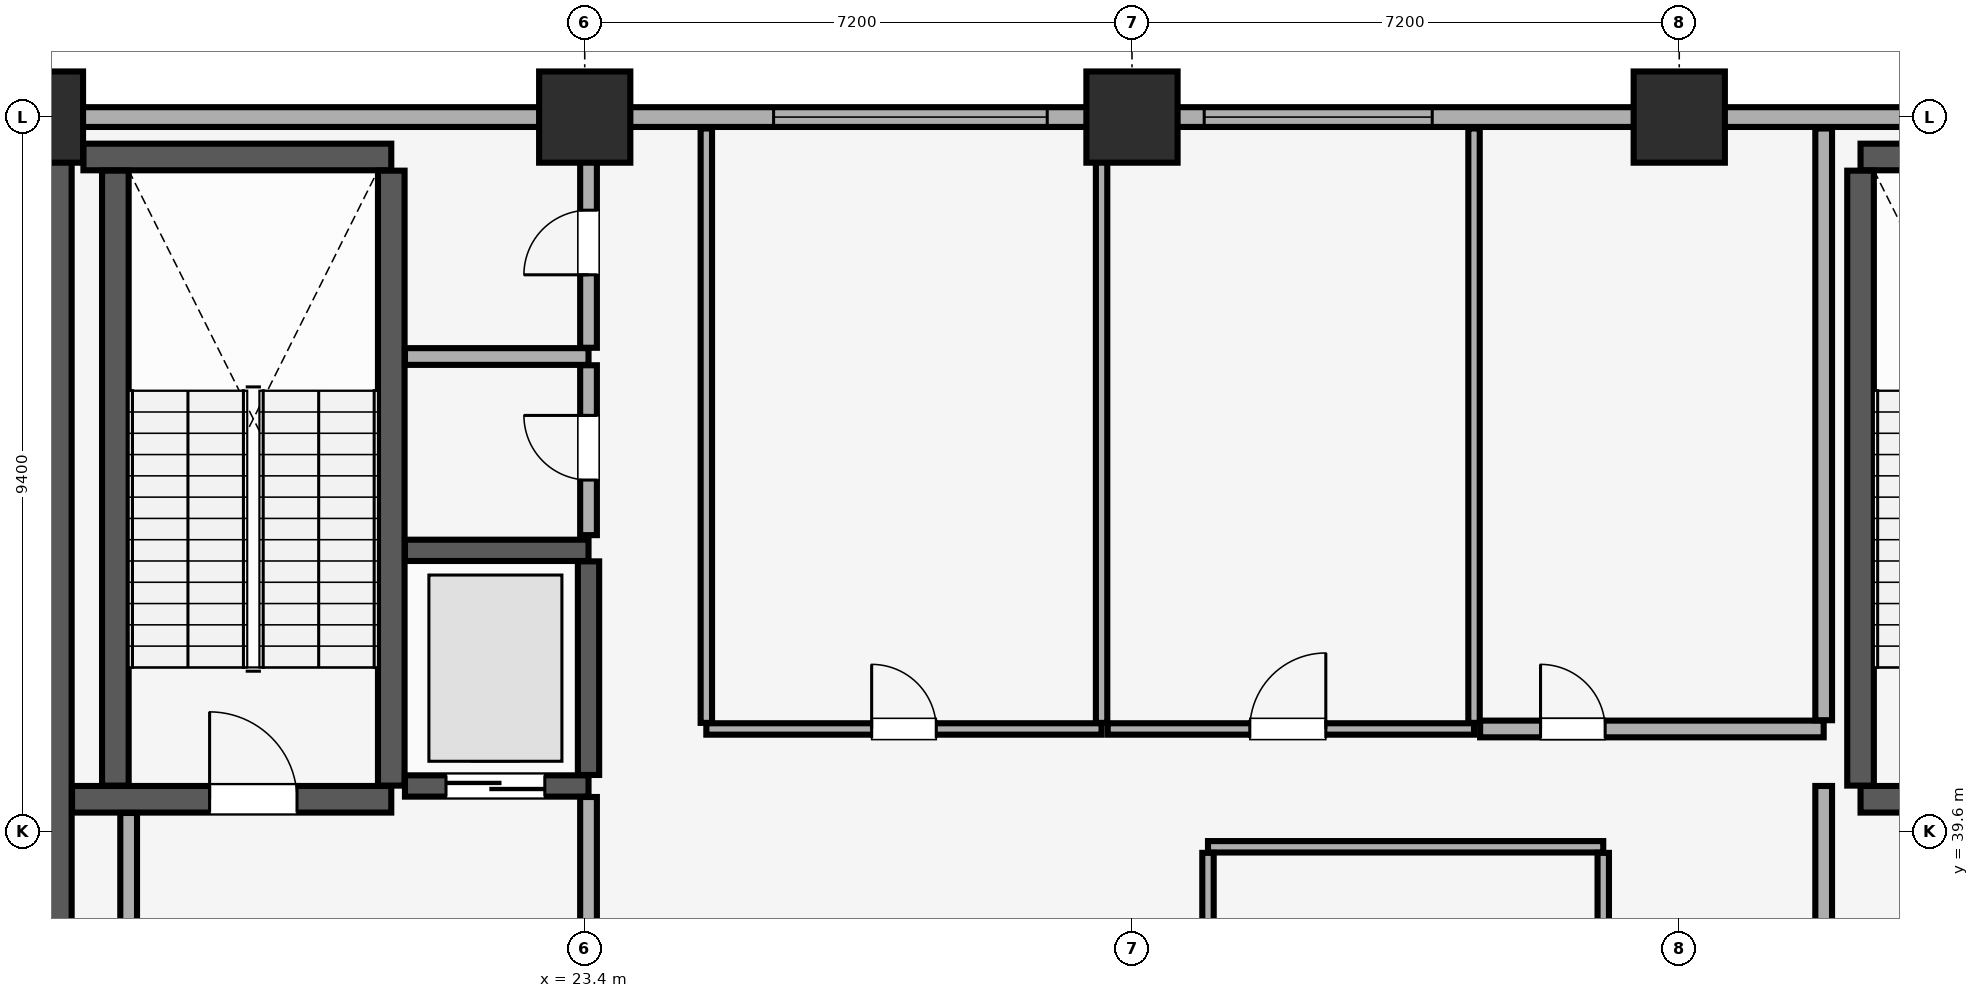
"""IFC4 building model, lengths in metres.
Left out: names, types, materials, properties, quantities, classifications, styles, units other than length and angle.
Written with IfcOpenShell. Run it as: python <this file> out.ifc"""

import sys

from ifc_helpers import new_model, si_unit, direction, frame, frame_2d, origin, origin_2d, place, context, subcontext, project, spatial, rectangle, extrude, element, fill, save


model = new_model("IFC4")
c1 = context("Model", 3, precision=1e-05, world=origin(), true_north=direction((0.0, 1.0)))
c2 = subcontext(c1, "Body", "Model", "MODEL_VIEW")
j1 = project(units=[si_unit("LENGTHUNIT", "METRE"), si_unit("PLANEANGLEUNIT", "RADIAN")], contexts=[c1])
p1 = place(None, origin())
s1 = spatial("IfcSite", under=j1, at=p1, CompositionType="ELEMENT")
p2 = place(p1, origin())
s2 = spatial("IfcBuilding", under=s1, at=p2, CompositionType="ELEMENT")
p3 = place(p2, frame((0.0, 0.0, 130.55)))
s3 = spatial("IfcBuildingStorey", under=s2, at=p3, CompositionType="ELEMENT", Elevation=130.55)
for number, where, z_axis, x_axis in (
    (1, (16.2, 49.0, 0.0), (0.0, 0.0, 1.0), (1.0, 0.0, 0.0)),
    (2, (23.4, 49.0, 0.0), (0.0, 0.0, 1.0), (1.0, 0.0, 0.0)),
    (3, (30.6, 49.0, 0.0), (0.0, 0.0, 1.0), (1.0, 0.0, 0.0)),
    (4, (37.8, 49.0, 0.0), (0.0, 0.0, 1.0), (1.0, 0.0, 0.0)),
):
    element("IfcColumn", number, at=place(p3, frame(where, z_axis=z_axis, x_axis=x_axis)), inside=s3, PredefinedType="COLUMN", context=c2, shape_type="SweptSolid", body=[
        extrude(rectangle(XDim=1.2, YDim=1.2, at=origin_2d()), origin(), (0.0, 0.0, 1.0), 4.56),
    ])
p4 = place(p3, frame((79.8, 49.0, 0.0), z_axis=(0.0, 0.0, 1.0), x_axis=(-1.0, 0.0, 0.0)))
e5 = element("IfcWall", 5, at=p4, inside=s3, PredefinedType="SOLIDWALL", context=c2, shape_type="SweptSolid", body=[
    extrude(rectangle(XDim=75.6, YDim=0.26, at=frame_2d((37.8, 0.0))), origin(), (0.0, 0.0, 1.0), 3.4),
])
p5 = place(p4, frame((71.815, 0.0, 0.85)))
e6 = element("IfcOpeningElement", 6, at=p5, cuts=e5, PredefinedType="OPENING", context=c2, shape_type="SweptSolid", body=[
    extrude(rectangle(XDim=3.0, YDim=1.5, at=frame_2d((1.5, 0.75))), frame((0.0, 0.14, 0.0), z_axis=(0.0, -1.0, 0.0), x_axis=(1.0, 0.0, 0.0)), (0.0, 0.0, 1.0), 0.28),
])
p6 = place(p4, frame((65.775, 0.0, 0.85)))
e7 = element("IfcOpeningElement", 7, at=p6, cuts=e5, PredefinedType="OPENING", context=c2, shape_type="SweptSolid", body=[
    extrude(rectangle(XDim=3.0, YDim=1.5, at=frame_2d((1.5, 0.75))), frame((0.0, 0.14, 0.0), z_axis=(0.0, -1.0, 0.0), x_axis=(1.0, 0.0, 0.0)), (0.0, 0.0, 1.0), 0.28),
])
p7 = place(p4, frame((6.825, 0.0, 0.85)))
e8 = element("IfcOpeningElement", 8, at=p7, cuts=e5, PredefinedType="OPENING", context=c2, shape_type="SweptSolid", body=[
    extrude(rectangle(XDim=3.0, YDim=1.5, at=frame_2d((1.5, 0.75))), frame((0.0, 0.14, 0.0), z_axis=(0.0, -1.0, 0.0), x_axis=(1.0, 0.0, 0.0)), (0.0, 0.0, 1.0), 0.28),
])
p8 = place(p4, frame((0.785, 0.0, 0.85)))
e9 = element("IfcOpeningElement", 9, at=p8, cuts=e5, PredefinedType="OPENING", context=c2, shape_type="SweptSolid", body=[
    extrude(rectangle(XDim=3.0, YDim=1.5, at=frame_2d((1.5, 0.75))), frame((0.0, 0.14, 0.0), z_axis=(0.0, -1.0, 0.0), x_axis=(1.0, 0.0, 0.0)), (0.0, 0.0, 1.0), 0.28),
])
p9 = place(p4, frame((50.315, 0.0, 0.9)))
e10 = element("IfcOpeningElement", 10, at=p9, cuts=e5, PredefinedType="OPENING", context=c2, shape_type="SweptSolid", body=[
    extrude(rectangle(XDim=3.6, YDim=1.5, at=frame_2d((1.8, 0.75))), frame((0.0, 0.14, 0.0), z_axis=(0.0, -1.0, 0.0), x_axis=(1.0, 0.0, 0.0)), (0.0, 0.0, 1.0), 0.28),
])
p10 = place(p4, frame((45.25, 0.0, 0.9)))
e11 = element("IfcOpeningElement", 11, at=p10, cuts=e5, PredefinedType="OPENING", context=c2, shape_type="SweptSolid", body=[
    extrude(rectangle(XDim=3.0, YDim=1.5, at=frame_2d((1.5, 0.75))), frame((0.0, 0.14, 0.0), z_axis=(0.0, -1.0, 0.0), x_axis=(1.0, 0.0, 0.0)), (0.0, 0.0, 1.0), 0.28),
])
p11 = place(p4, frame((28.1, 0.0, 0.9)))
e12 = element("IfcOpeningElement", 12, at=p11, cuts=e5, PredefinedType="OPENING", context=c2, shape_type="SweptSolid", body=[
    extrude(rectangle(XDim=3.6, YDim=1.5, at=frame_2d((1.8, 0.75))), frame((0.0, 0.14, 0.0), z_axis=(0.0, -1.0, 0.0), x_axis=(1.0, 0.0, 0.0)), (0.0, 0.0, 1.0), 0.28),
])
p12 = place(p4, frame((23.035, 0.0, 0.9)))
e13 = element("IfcOpeningElement", 13, at=p12, cuts=e5, PredefinedType="OPENING", context=c2, shape_type="SweptSolid", body=[
    extrude(rectangle(XDim=2.4, YDim=1.5, at=frame_2d((1.2, 0.75))), frame((0.0, 0.14, 0.0), z_axis=(0.0, -1.0, 0.0), x_axis=(1.0, 0.0, 0.0)), (0.0, 0.0, 1.0), 0.28),
])
p13 = place(p3, frame((16.2, 29.4, 0.0), z_axis=(0.0, 0.0, 1.0), x_axis=(0.0, 1.0, 0.0)))
e14 = element("IfcWall", 14, at=p13, inside=s3, PredefinedType="SHEAR", context=c2, shape_type="SweptSolid", body=[
    extrude(rectangle(XDim=19.2, YDim=0.9, at=frame_2d((9.6, 0.0))), origin(), (0.0, 0.0, 1.0), 4.52),
])
p14 = place(p3, frame((16.655, 40.025, 0.0), z_axis=(0.0, 0.0, 1.0), x_axis=(1.0, 0.0, 0.0)))
e15 = element("IfcWall", 15, at=p14, inside=s3, PredefinedType="SHEAR", context=c2, shape_type="SweptSolid", body=[
    extrude(rectangle(XDim=4.2, YDim=0.35, at=frame_2d((2.1, 0.0))), origin(), (0.0, 0.0, 1.0), 4.52),
])
p15 = place(p14, frame((1.81, 0.0, 0.0)))
e16 = element("IfcOpeningElement", 16, at=p15, cuts=e15, PredefinedType="OPENING", context=c2, shape_type="SweptSolid", body=[
    extrude(rectangle(XDim=1.15, YDim=2.15, at=frame_2d((0.575, 1.075))), frame((0.0, 0.185, 0.0), z_axis=(0.0, -1.0, 0.0), x_axis=(1.0, 0.0, 0.0)), (0.0, 0.0, 1.0), 0.37),
])
p16 = place(p3, frame((16.805, 48.475, 0.0), z_axis=(0.0, 0.0, 1.0), x_axis=(1.0, 0.0, 0.0)))
e17 = element("IfcWall", 17, at=p16, inside=s3, PredefinedType="SHEAR", context=c2, shape_type="SweptSolid", body=[
    extrude(rectangle(XDim=4.05, YDim=0.35, at=frame_2d((2.025, 0.0))), origin(), (0.0, 0.0, 1.0), 4.52),
])
for number, where, z_axis, x_axis in (
    (18, (17.225, 40.205, 0.0), (0.0, 0.0, 1.0), (0.0, 1.0, 0.0)),
    (19, (20.855, 40.205, 0.0), (0.0, 0.0, 1.0), (0.0, 1.0, 0.0)),
):
    element("IfcWall", number, at=place(p3, frame(where, z_axis=z_axis, x_axis=x_axis)), inside=s3, PredefinedType="SHEAR", context=c2, shape_type="SweptSolid", body=[
        extrude(rectangle(XDim=8.09, YDim=0.35, at=frame_2d((4.045, 0.0))), origin(), (0.0, 0.0, 1.0), 4.52),
    ])
p17 = place(p3, frame((40.185, 40.025, 0.0), z_axis=(0.0, 0.0, 1.0), x_axis=(1.0, 0.0, 0.0)))
e20 = element("IfcWall", 20, at=p17, inside=s3, PredefinedType="SHEAR", context=c2, shape_type="SweptSolid", body=[
    extrude(rectangle(XDim=3.63, YDim=0.35, at=frame_2d((1.815, 0.0))), origin(), (0.0, 0.0, 1.0), 4.52),
])
p18 = place(p17, frame((1.24, 0.0, 0.0)))
e21 = element("IfcOpeningElement", 21, at=p18, cuts=e20, PredefinedType="OPENING", context=c2, shape_type="SweptSolid", body=[
    extrude(rectangle(XDim=1.15, YDim=2.15, at=frame_2d((0.575, 1.075))), frame((0.0, 0.185, 0.0), z_axis=(0.0, -1.0, 0.0), x_axis=(1.0, 0.0, 0.0)), (0.0, 0.0, 1.0), 0.37),
])
p19 = place(p3, frame((40.185, 48.475, 0.0), z_axis=(0.0, 0.0, 1.0), x_axis=(1.0, 0.0, 0.0)))
e22 = element("IfcWall", 22, at=p19, inside=s3, PredefinedType="SHEAR", context=c2, shape_type="SweptSolid", body=[
    extrude(rectangle(XDim=3.63, YDim=0.35, at=frame_2d((1.815, 0.0))), origin(), (0.0, 0.0, 1.0), 4.52),
])
p20 = place(p3, frame((40.185, 40.205, 0.0), z_axis=(0.0, 0.0, 1.0), x_axis=(0.0, 1.0, 0.0)))
e23 = element("IfcWall", 23, at=p20, inside=s3, PredefinedType="SHEAR", context=c2, shape_type="SweptSolid", body=[
    extrude(rectangle(XDim=8.09, YDim=0.35, at=frame_2d((4.045, 0.0))), origin(), (0.0, 0.0, 1.0), 4.52),
])
p21 = place(p3, frame((21.035, 40.2, 0.0), z_axis=(0.0, 0.0, 1.0), x_axis=(1.0, 0.0, 0.0)))
e24 = element("IfcWall", 24, at=p21, inside=s3, PredefinedType="SHEAR", context=c2, shape_type="SweptSolid", body=[
    extrude(rectangle(XDim=2.415, YDim=0.28, at=frame_2d((1.208, 0.0))), origin(), (0.0, 0.0, 1.0), 4.52),
])
p22 = place(p21, frame((0.54, 0.0, 0.0)))
e25 = element("IfcOpeningElement", 25, at=p22, cuts=e24, PredefinedType="OPENING", context=c2, shape_type="SweptSolid", body=[
    extrude(rectangle(XDim=1.3, YDim=2.3, at=frame_2d((0.65, 1.15))), frame((0.0, 0.15, 0.0), z_axis=(0.0, -1.0, 0.0), x_axis=(1.0, 0.0, 0.0)), (0.0, 0.0, 1.0), 0.3),
])
p23 = place(p3, frame((21.035, 43.3, 0.0), z_axis=(0.0, 0.0, 1.0), x_axis=(1.0, 0.0, 0.0)))
e26 = element("IfcWall", 26, at=p23, inside=s3, PredefinedType="SHEAR", context=c2, shape_type="SweptSolid", body=[
    extrude(rectangle(XDim=2.415, YDim=0.28, at=frame_2d((1.208, 0.0))), origin(), (0.0, 0.0, 1.0), 4.52),
])
p24 = place(p3, frame((23.45, 40.345, 0.0), z_axis=(0.0, 0.0, 1.0), x_axis=(0.0, 1.0, 0.0)))
e27 = element("IfcWall", 27, at=p24, inside=s3, PredefinedType="SHEAR", context=c2, shape_type="SweptSolid", body=[
    extrude(rectangle(XDim=2.81, YDim=0.28, at=frame_2d((1.405, 0.0))), origin(), (0.0, 0.0, 1.0), 4.52),
])
p25 = place(p3, frame((17.4, 34.415, 0.0), z_axis=(0.0, 0.0, 1.0), x_axis=(0.0, 1.0, 0.0)))
e28 = element("IfcWall", 28, at=p25, inside=s3, PredefinedType="PARTITIONING", context=c2, shape_type="SweptSolid", body=[
    extrude(rectangle(XDim=5.43, YDim=0.22, at=frame_2d((2.715, 0.0))), origin(), (0.0, 0.0, 1.0), 4.52),
])
p26 = place(p3, frame((23.45, 34.415, 0.0), z_axis=(0.0, 0.0, 1.0), x_axis=(0.0, 1.0, 0.0)))
e29 = element("IfcWall", 29, at=p26, inside=s3, PredefinedType="PARTITIONING", context=c2, shape_type="SweptSolid", body=[
    extrude(rectangle(XDim=5.64, YDim=0.22, at=frame_2d((2.82, 0.0))), origin(), (0.0, 0.0, 1.0), 4.52),
])
p27 = place(p3, frame((39.7, 34.415, 0.0), z_axis=(0.0, 0.0, 1.0), x_axis=(0.0, 1.0, 0.0)))
e30 = element("IfcWall", 30, at=p27, inside=s3, PredefinedType="PARTITIONING", context=c2, shape_type="SweptSolid", body=[
    extrude(rectangle(XDim=5.785, YDim=0.22, at=frame_2d((2.893, 0.0))), origin(), (0.0, 0.0, 1.0), 4.52),
])
p28 = place(p3, frame((21.035, 45.85, 0.0), z_axis=(0.0, 0.0, 1.0), x_axis=(1.0, 0.0, 0.0)))
e31 = element("IfcWall", 31, at=p28, inside=s3, PredefinedType="PARTITIONING", context=c2, shape_type="SweptSolid", body=[
    extrude(rectangle(XDim=2.415, YDim=0.22, at=frame_2d((1.208, 0.0))), origin(), (0.0, 0.0, 1.0), 4.52),
])
p29 = place(p3, frame((23.45, 43.5, 0.0), z_axis=(0.0, 0.0, 1.0), x_axis=(0.0, 1.0, 0.0)))
e32 = element("IfcWall", 32, at=p29, inside=s3, PredefinedType="PARTITIONING", context=c2, shape_type="SweptSolid", body=[
    extrude(rectangle(XDim=2.235, YDim=0.22, at=frame_2d((1.118, 0.0))), origin(), (0.0, 0.0, 1.0), 4.52),
])
p30 = place(p29, frame((0.725, 0.0, 0.0)))
e33 = element("IfcOpeningElement", 33, at=p30, cuts=e32, PredefinedType="OPENING", context=c2, shape_type="SweptSolid", body=[
    extrude(rectangle(XDim=0.85, YDim=2.1, at=frame_2d((0.425, 1.05))), frame((0.0, 0.12, 0.0), z_axis=(0.0, -1.0, 0.0), x_axis=(1.0, 0.0, 0.0)), (0.0, 0.0, 1.0), 0.24),
])
p31 = place(p3, frame((23.45, 45.965, 0.0), z_axis=(0.0, 0.0, 1.0), x_axis=(0.0, 1.0, 0.0)))
e34 = element("IfcWall", 34, at=p31, inside=s3, PredefinedType="PARTITIONING", context=c2, shape_type="SweptSolid", body=[
    extrude(rectangle(XDim=2.885, YDim=0.22, at=frame_2d((1.442, 0.0))), origin(), (0.0, 0.0, 1.0), 4.52),
])
p32 = place(p31, frame((0.96, 0.0, 0.0)))
e35 = element("IfcOpeningElement", 35, at=p32, cuts=e34, PredefinedType="OPENING", context=c2, shape_type="SweptSolid", body=[
    extrude(rectangle(XDim=0.85, YDim=2.1, at=frame_2d((0.425, 1.05))), frame((0.0, 0.12, 0.0), z_axis=(0.0, -1.0, 0.0), x_axis=(1.0, 0.0, 0.0)), (0.0, 0.0, 1.0), 0.24),
])
p33 = place(p3, frame((31.6, 39.4, 0.0), z_axis=(0.0, 0.0, 1.0), x_axis=(1.0, 0.0, 0.0)))
e36 = element("IfcWall", 36, at=p33, inside=s3, PredefinedType="PARTITIONING", context=c2, shape_type="SweptSolid", body=[
    extrude(rectangle(XDim=5.2, YDim=0.15, at=frame_2d((2.6, 0.0))), origin(), (0.0, 0.0, 1.0), 4.52),
])
for number, where, z_axis, x_axis in (
    (37, (31.6, 34.38, 0.0), (0.0, 0.0, 1.0), (0.0, 1.0, 0.0)),
    (38, (36.8, 34.38, 0.0), (0.0, 0.0, 1.0), (0.0, 1.0, 0.0)),
):
    element("IfcWall", number, at=place(p3, frame(where, z_axis=z_axis, x_axis=x_axis)), inside=s3, PredefinedType="PARTITIONING", context=c2, shape_type="SweptSolid", body=[
        extrude(rectangle(XDim=4.94, YDim=0.15, at=frame_2d((2.47, 0.0))), origin(), (0.0, 0.0, 1.0), 4.52),
    ])
p34 = place(p3, frame((25.0, 40.95, 0.0), z_axis=(0.0, 0.0, 1.0), x_axis=(1.0, 0.0, 0.0)))
e39 = element("IfcWall", 39, at=p34, inside=s3, PredefinedType="PARTITIONING", context=c2, shape_type="SweptSolid", body=[
    extrude(rectangle(XDim=5.2, YDim=0.15, at=frame_2d((2.6, 0.0))), origin(), (0.0, 0.0, 1.0), 4.52),
])
p35 = place(p34, frame((2.175, 0.0, 0.0)))
e40 = element("IfcOpeningElement", 40, at=p35, cuts=e39, PredefinedType="OPENING", context=c2, shape_type="SweptSolid", body=[
    extrude(rectangle(XDim=0.85, YDim=2.1, at=frame_2d((0.425, 1.05))), frame((0.0, 0.085, 0.0), z_axis=(0.0, -1.0, 0.0), x_axis=(1.0, 0.0, 0.0)), (0.0, 0.0, 1.0), 0.17),
])
for number, where, z_axis, x_axis in (
    (41, (25.0, 41.03, 0.0), (0.0, 0.0, 1.0), (0.0, 1.0, 0.0)),
    (42, (30.2, 41.03, 0.0), (0.0, 0.0, 1.0), (0.0, 1.0, 0.0)),
):
    element("IfcWall", number, at=place(p3, frame(where, z_axis=z_axis, x_axis=x_axis)), inside=s3, PredefinedType="PARTITIONING", context=c2, shape_type="SweptSolid", body=[
        extrude(rectangle(XDim=7.82, YDim=0.15, at=frame_2d((3.91, 0.0))), origin(), (0.0, 0.0, 1.0), 4.52),
    ])
p36 = place(p3, frame((30.28, 40.95, 0.0), z_axis=(0.0, 0.0, 1.0), x_axis=(1.0, 0.0, 0.0)))
e43 = element("IfcWall", 43, at=p36, inside=s3, PredefinedType="PARTITIONING", context=c2, shape_type="SweptSolid", body=[
    extrude(rectangle(XDim=4.82, YDim=0.15, at=frame_2d((2.41, 0.0))), origin(), (0.0, 0.0, 1.0), 4.52),
])
p37 = place(p36, frame((1.87, 0.0, 0.0)))
e44 = element("IfcOpeningElement", 44, at=p37, cuts=e43, PredefinedType="OPENING", context=c2, shape_type="SweptSolid", body=[
    extrude(rectangle(XDim=1.0, YDim=2.15, at=frame_2d((0.5, 1.075))), frame((0.0, 0.085, 0.0), z_axis=(0.0, -1.0, 0.0), x_axis=(1.0, 0.0, 0.0)), (0.0, 0.0, 1.0), 0.17),
])
p38 = place(p3, frame((35.1, 41.03, 0.0), z_axis=(0.0, 0.0, 1.0), x_axis=(0.0, 1.0, 0.0)))
e45 = element("IfcWall", 45, at=p38, inside=s3, PredefinedType="PARTITIONING", context=c2, shape_type="SweptSolid", body=[
    extrude(rectangle(XDim=7.82, YDim=0.15, at=frame_2d((3.91, 0.0))), origin(), (0.0, 0.0, 1.0), 4.52),
])
p39 = place(p3, frame((35.18, 40.95, 0.0), z_axis=(0.0, 0.0, 1.0), x_axis=(1.0, 0.0, 0.0)))
e46 = element("IfcWall", 46, at=p39, inside=s3, PredefinedType="PARTITIONING", context=c2, shape_type="SweptSolid", body=[
    extrude(rectangle(XDim=4.52, YDim=0.22, at=frame_2d((2.26, 0.0))), origin(), (0.0, 0.0, 1.0), 4.52),
])
p40 = place(p39, frame((0.795, 0.0, 0.0)))
e47 = element("IfcOpeningElement", 47, at=p40, cuts=e46, PredefinedType="OPENING", context=c2, shape_type="SweptSolid", body=[
    extrude(rectangle(XDim=0.85, YDim=2.1, at=frame_2d((0.425, 1.05))), frame((0.0, 0.12, 0.0), z_axis=(0.0, -1.0, 0.0), x_axis=(1.0, 0.0, 0.0)), (0.0, 0.0, 1.0), 0.24),
])
p41 = place(p3, frame((39.7, 41.065, 0.0), z_axis=(0.0, 0.0, 1.0), x_axis=(0.0, 1.0, 0.0)))
e48 = element("IfcWall", 48, at=p41, inside=s3, PredefinedType="PARTITIONING", context=c2, shape_type="SweptSolid", body=[
    extrude(rectangle(XDim=7.785, YDim=0.22, at=frame_2d((3.893, 0.0))), origin(), (0.0, 0.0, 1.0), 4.52),
])
p42 = place(p9, origin())
e49 = element("IfcWindow", 49, at=p42, inside=s3, PartitioningType="SINGLE_PANEL", PredefinedType="WINDOW", context=c2, shape_type="SweptSolid", body=[
    extrude(rectangle(XDim=3.6, YDim=1.5, at=frame_2d((1.8, 0.75))), frame((0.0, 0.03, 0.0), z_axis=(0.0, -1.0, 0.0), x_axis=(1.0, 0.0, 0.0)), (0.0, 0.0, 1.0), 0.06),
])
fill(e10, e49)
p43 = place(p10, origin())
e50 = element("IfcWindow", 50, at=p43, inside=s3, PartitioningType="SINGLE_PANEL", PredefinedType="WINDOW", context=c2, shape_type="SweptSolid", body=[
    extrude(rectangle(XDim=3.0, YDim=1.5, at=frame_2d((1.5, 0.75))), frame((0.0, 0.03, 0.0), z_axis=(0.0, -1.0, 0.0), x_axis=(1.0, 0.0, 0.0)), (0.0, 0.0, 1.0), 0.06),
])
fill(e11, e50)
p44 = place(p15, origin())
e51 = element("IfcDoor", 51, at=p44, inside=s3, OperationType="SINGLE_SWING_LEFT", PredefinedType="DOOR", context=c2, shape_type="SweptSolid", body=[
    extrude(rectangle(XDim=1.15, YDim=2.15, at=frame_2d((0.575, 1.075))), frame((0.0, 0.025, 0.0), z_axis=(0.0, -1.0, 0.0), x_axis=(1.0, 0.0, 0.0)), (0.0, 0.0, 1.0), 0.05),
])
fill(e16, e51)
p45 = place(p22, origin())
e52 = element("IfcDoor", 52, at=p45, inside=s3, OperationType="DOUBLE_DOOR_SLIDING", PredefinedType="DOOR", context=c2, shape_type="SweptSolid", body=[
    extrude(rectangle(XDim=1.3, YDim=2.3, at=frame_2d((0.65, 1.15))), frame((0.0, 0.025, 0.0), z_axis=(0.0, -1.0, 0.0), x_axis=(1.0, 0.0, 0.0)), (0.0, 0.0, 1.0), 0.05),
])
fill(e25, e52)
p46 = place(p30, origin())
e53 = element("IfcDoor", 53, at=p46, inside=s3, OperationType="SINGLE_SWING_RIGHT", PredefinedType="DOOR", context=c2, shape_type="SweptSolid", body=[
    extrude(rectangle(XDim=0.85, YDim=2.1, at=frame_2d((0.425, 1.05))), frame((0.0, 0.025, 0.0), z_axis=(0.0, -1.0, 0.0), x_axis=(1.0, 0.0, 0.0)), (0.0, 0.0, 1.0), 0.05),
])
fill(e33, e53)
p47 = place(p32, origin())
e54 = element("IfcDoor", 54, at=p47, inside=s3, OperationType="SINGLE_SWING_LEFT", PredefinedType="DOOR", context=c2, shape_type="SweptSolid", body=[
    extrude(rectangle(XDim=0.85, YDim=2.1, at=frame_2d((0.425, 1.05))), frame((0.0, 0.025, 0.0), z_axis=(0.0, -1.0, 0.0), x_axis=(1.0, 0.0, 0.0)), (0.0, 0.0, 1.0), 0.05),
])
fill(e35, e54)
p48 = place(p35, origin())
e55 = element("IfcDoor", 55, at=p48, inside=s3, OperationType="SINGLE_SWING_LEFT", PredefinedType="DOOR", context=c2, shape_type="SweptSolid", body=[
    extrude(rectangle(XDim=0.85, YDim=2.1, at=frame_2d((0.425, 1.05))), frame((0.0, 0.025, 0.0), z_axis=(0.0, -1.0, 0.0), x_axis=(1.0, 0.0, 0.0)), (0.0, 0.0, 1.0), 0.05),
])
fill(e40, e55)
p49 = place(p37, origin())
e56 = element("IfcDoor", 56, at=p49, inside=s3, OperationType="SINGLE_SWING_RIGHT", PredefinedType="DOOR", context=c2, shape_type="SweptSolid", body=[
    extrude(rectangle(XDim=1.0, YDim=2.15, at=frame_2d((0.5, 1.075))), frame((0.0, 0.025, 0.0), z_axis=(0.0, -1.0, 0.0), x_axis=(1.0, 0.0, 0.0)), (0.0, 0.0, 1.0), 0.05),
])
fill(e44, e56)
p50 = place(p40, origin())
e57 = element("IfcDoor", 57, at=p50, inside=s3, OperationType="SINGLE_SWING_LEFT", PredefinedType="DOOR", context=c2, shape_type="SweptSolid", body=[
    extrude(rectangle(XDim=0.85, YDim=2.1, at=frame_2d((0.425, 1.05))), frame((0.0, 0.025, 0.0), z_axis=(0.0, -1.0, 0.0), x_axis=(1.0, 0.0, 0.0)), (0.0, 0.0, 1.0), 0.05),
])
fill(e47, e57)
save(model, sys.argv[1])
